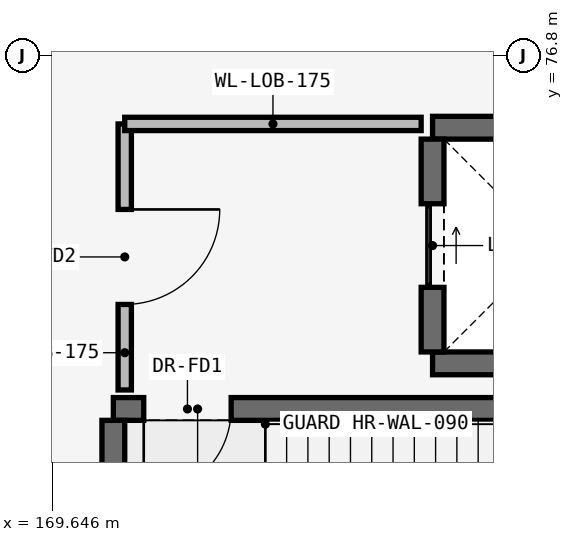
"""IFC4 building model, lengths in metres.
Left out: names, types, materials, properties, quantities, classifications, styles, units other than length and angle.
Written with IfcOpenShell. Run it as: python <this file> out.ifc"""

import sys

from ifc_helpers import new_model, si_unit, direction, frame, frame_2d, origin, place, context, subcontext, project, spatial, rectangle, extrude, element, fill, save


model = new_model("IFC4")
c1 = context("Model", 3, precision=1e-05, world=origin(), true_north=direction((0.0, 1.0)))
c2 = subcontext(c1, "Body", "Model", "MODEL_VIEW")
j1 = project(units=[si_unit("LENGTHUNIT", "METRE"), si_unit("PLANEANGLEUNIT", "RADIAN")], contexts=[c1])
p1 = place(None, origin())
s1 = spatial("IfcSite", under=j1, at=p1, CompositionType="ELEMENT")
p2 = place(p1, origin())
s2 = spatial("IfcBuilding", under=s1, at=p2, CompositionType="ELEMENT")
p3 = place(p2, origin())
s3 = spatial("IfcBuildingStorey", under=s2, at=p3, CompositionType="ELEMENT", Elevation=0.0)
p4 = place(p3, frame((170.45, 72.15, 0.0), z_axis=(0.0, 0.0, 1.0), x_axis=(1.0, 0.0, 0.0)))
e1 = element("IfcWall", 1, at=p4, inside=s3, PredefinedType="SHEAR", context=c2, shape_type="SweptSolid", body=[
    extrude(rectangle(XDim=7.92, YDim=0.3, at=frame_2d((3.96, 0.0))), origin(), (0.0, 0.0, 1.0), 5.08),
])
p5 = place(p4, frame((0.4, 0.0, 0.0)))
e2 = element("IfcOpeningElement", 2, at=p5, cuts=e1, PredefinedType="OPENING", context=c2, shape_type="SweptSolid", body=[
    extrude(rectangle(XDim=1.15, YDim=2.15, at=frame_2d((0.575, 1.075))), frame((0.0, 0.165, 0.0), z_axis=(0.0, -1.0, 0.0), x_axis=(1.0, 0.0, 0.0)), (0.0, 0.0, 1.0), 0.33),
])
p6 = place(p3, frame((170.45, 68.1, 0.0), z_axis=(0.0, 0.0, 1.0), x_axis=(0.0, 1.0, 0.0)))
e3 = element("IfcWall", 3, at=p6, inside=s3, PredefinedType="SHEAR", context=c2, shape_type="SweptSolid", body=[
    extrude(rectangle(XDim=3.9, YDim=0.3, at=frame_2d((1.95, 0.0))), origin(), (0.0, 0.0, 1.0), 5.08),
])
for number, where, z_axis, x_axis in (
    (4, (174.65, 72.75, 0.0), (0.0, 0.0, 1.0), (1.0, 0.0, 0.0)),
    (5, (174.65, 75.85, 0.0), (0.0, 0.0, 1.0), (1.0, 0.0, 0.0)),
):
    element("IfcWall", number, at=place(p3, frame(where, z_axis=z_axis, x_axis=x_axis)), inside=s3, PredefinedType="SHEAR", context=c2, shape_type="SweptSolid", body=[
        extrude(rectangle(XDim=3.1, YDim=0.3, at=frame_2d((1.55, 0.0))), origin(), (0.0, 0.0, 1.0), 5.08),
    ])
p7 = place(p3, frame((174.65, 72.9, 0.0), z_axis=(0.0, 0.0, 1.0), x_axis=(0.0, 1.0, 0.0)))
e6 = element("IfcWall", 6, at=p7, inside=s3, PredefinedType="SHEAR", context=c2, shape_type="SweptSolid", body=[
    extrude(rectangle(XDim=2.8, YDim=0.3, at=frame_2d((1.4, 0.0))), origin(), (0.0, 0.0, 1.0), 5.08),
])
p8 = place(p7, frame((0.85, 0.0, 0.0)))
e7 = element("IfcOpeningElement", 7, at=p8, cuts=e6, PredefinedType="OPENING", context=c2, shape_type="SweptSolid", body=[
    extrude(rectangle(XDim=1.1, YDim=2.15, at=frame_2d((0.55, 1.075))), frame((0.0, 0.165, 0.0), z_axis=(0.0, -1.0, 0.0), x_axis=(1.0, 0.0, 0.0)), (0.0, 0.0, 1.0), 0.33),
])
p9 = place(p3, frame((170.6, 72.4, 0.0), z_axis=(0.0, 0.0, 1.0), x_axis=(0.0, 1.0, 0.0)))
e8 = element("IfcWall", 8, at=p9, inside=s3, PredefinedType="PARTITIONING", context=c2, shape_type="SweptSolid", body=[
    extrude(rectangle(XDim=3.5, YDim=0.175, at=frame_2d((1.75, 0.0))), origin(), (0.0, 0.0, 1.0), 5.08),
])
p10 = place(p9, frame((1.125, 0.0, 0.0)))
e9 = element("IfcOpeningElement", 9, at=p10, cuts=e8, PredefinedType="OPENING", context=c2, shape_type="SweptSolid", body=[
    extrude(rectangle(XDim=1.25, YDim=2.2, at=frame_2d((0.625, 1.1))), frame((0.0, 0.103, 0.0), z_axis=(0.0, -1.0, 0.0), x_axis=(1.0, 0.0, 0.0)), (0.0, 0.0, 1.0), 0.205),
])
p11 = place(p3, frame((170.6, 75.9, 0.0), z_axis=(0.0, 0.0, 1.0), x_axis=(1.0, 0.0, 0.0)))
e10 = element("IfcWall", 10, at=p11, inside=s3, PredefinedType="PARTITIONING", context=c2, shape_type="SweptSolid", body=[
    extrude(rectangle(XDim=3.9, YDim=0.175, at=frame_2d((1.95, 0.0))), origin(), (0.0, 0.0, 1.0), 5.08),
])
p12 = place(p5, origin())
e11 = element("IfcDoor", 11, at=p12, inside=s3, OperationType="SINGLE_SWING_LEFT", PredefinedType="DOOR", context=c2, shape_type="SweptSolid", body=[
    extrude(rectangle(XDim=1.15, YDim=2.15, at=frame_2d((0.575, 1.075))), frame((0.0, 0.025, 0.0), z_axis=(0.0, -1.0, 0.0), x_axis=(1.0, 0.0, 0.0)), (0.0, 0.0, 1.0), 0.05),
])
fill(e2, e11)
p13 = place(p8, origin())
e12 = element("IfcDoor", 12, at=p13, inside=s3, OperationType="SLIDING_TO_LEFT", PredefinedType="DOOR", context=c2, shape_type="SweptSolid", body=[
    extrude(rectangle(XDim=1.1, YDim=2.15, at=frame_2d((0.55, 1.075))), frame((0.0, 0.025, 0.0), z_axis=(0.0, -1.0, 0.0), x_axis=(1.0, 0.0, 0.0)), (0.0, 0.0, 1.0), 0.05),
])
fill(e7, e12)
p14 = place(p10, frame((1.25, 0.0, 0.0), z_axis=(0.0, 0.0, 1.0), x_axis=(-1.0, 0.0, 0.0)))
e13 = element("IfcDoor", 13, at=p14, inside=s3, OperationType="SINGLE_SWING_RIGHT", PredefinedType="DOOR", context=c2, shape_type="SweptSolid", body=[
    extrude(rectangle(XDim=1.25, YDim=2.2, at=frame_2d((0.625, 1.1))), frame((0.0, 0.025, 0.0), z_axis=(0.0, -1.0, 0.0), x_axis=(1.0, 0.0, 0.0)), (0.0, 0.0, 1.0), 0.05),
])
fill(e9, e13)
save(model, sys.argv[1])
